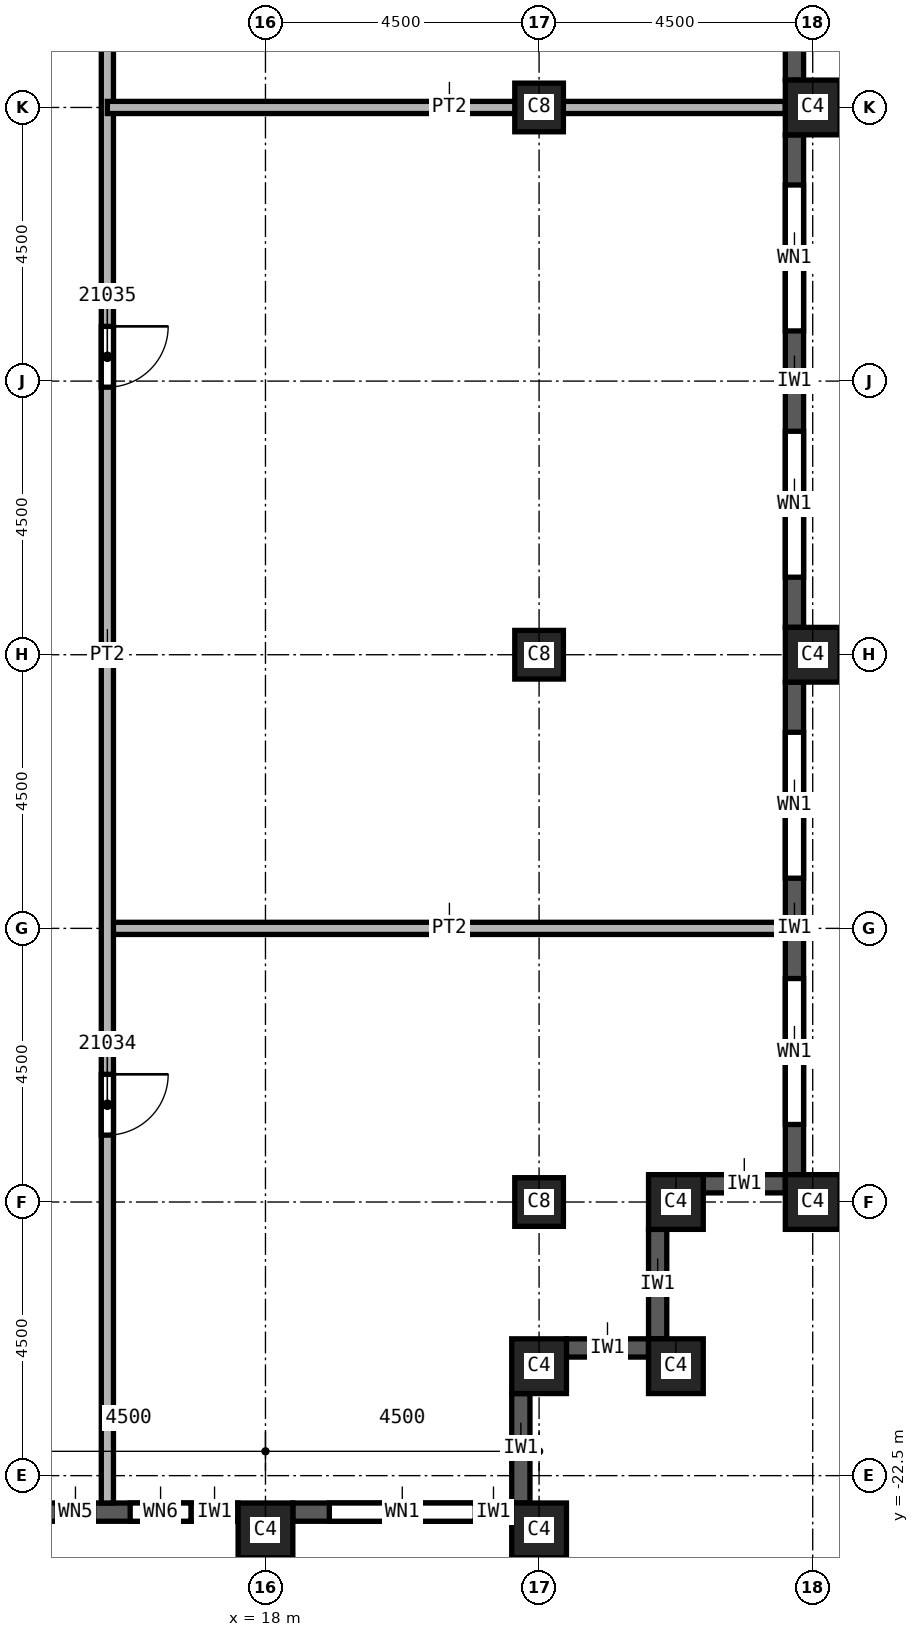
"""IFC4 building model, lengths in metres.
Left out: names, types, materials, properties, quantities, classifications, styles, units other than length and angle.
Written with IfcOpenShell. Run it as: python <this file> out.ifc"""

import sys

from ifc_helpers import new_model, si_unit, direction, frame, frame_2d, origin, origin_2d, place, context, subcontext, project, spatial, rectangle, extrude, element, fill, save


model = new_model("IFC4")
c1 = context("Model", 3, precision=1e-05, world=origin(), true_north=direction((0.0, 1.0)))
c2 = subcontext(c1, "Body", "Model", "MODEL_VIEW")
j1 = project(units=[si_unit("LENGTHUNIT", "METRE"), si_unit("PLANEANGLEUNIT", "RADIAN")], contexts=[c1])
p1 = place(None, origin())
s1 = spatial("IfcSite", under=j1, at=p1, CompositionType="ELEMENT")
p2 = place(p1, origin())
s2 = spatial("IfcBuilding", under=s1, at=p2, CompositionType="ELEMENT")
p3 = place(p2, frame((0.0, 0.0, 308.0)))
s3 = spatial("IfcBuildingStorey", under=s2, at=p3, CompositionType="ELEMENT", Elevation=308.0)
for number, where, z_axis, x_axis in (
    (1, (22.5, 0.0, 0.0), (0.0, 0.0, 1.0), (1.0, 0.0, 0.0)),
    (2, (22.5, -9.0, 0.0), (0.0, 0.0, 1.0), (1.0, 0.0, 0.0)),
    (3, (22.5, -18.0, 0.0), (0.0, 0.0, 1.0), (1.0, 0.0, 0.0)),
):
    element("IfcColumn", number, at=place(p3, frame(where, z_axis=z_axis, x_axis=x_axis)), inside=s3, PredefinedType="COLUMN", context=c2, shape_type="SweptSolid", body=[
        extrude(rectangle(XDim=0.8, YDim=0.8, at=origin_2d()), origin(), (0.0, 0.0, 1.0), 3.74),
    ])
for number, where, z_axis, x_axis in (
    (4, (27.0, 0.0, 0.0), (0.0, 0.0, 1.0), (0.0, 1.0, 0.0)),
    (5, (27.0, -9.0, 0.0), (0.0, 0.0, 1.0), (0.0, 1.0, 0.0)),
    (6, (27.0, -18.0, 0.0), (0.0, 0.0, 1.0), (0.0, 1.0, 0.0)),
    (7, (18.0, -23.4, 0.0), (0.0, 0.0, 1.0), (1.0, 0.0, 0.0)),
    (8, (22.5, -23.4, 0.0), (0.0, 0.0, 1.0), (1.0, 0.0, 0.0)),
    (9, (22.5, -20.7, 0.0), (0.0, 0.0, 1.0), (1.0, 0.0, 0.0)),
    (10, (24.75, -20.7, 0.0), (0.0, 0.0, 1.0), (1.0, 0.0, 0.0)),
    (11, (24.75, -18.0, 0.0), (0.0, 0.0, 1.0), (1.0, 0.0, 0.0)),
):
    element("IfcColumn", number, at=place(p3, frame(where, z_axis=z_axis, x_axis=x_axis)), inside=s3, PredefinedType="COLUMN", context=c2, shape_type="SweptSolid", body=[
        extrude(rectangle(XDim=0.9, YDim=0.9, at=origin_2d()), origin(), (0.0, 0.0, 1.0), 3.74),
    ])
p4 = place(p3, frame((13.95, -23.1, 0.0), z_axis=(0.0, 0.0, 1.0), x_axis=(1.0, 0.0, 0.0)))
e12 = element("IfcWall", 12, at=p4, inside=s3, PredefinedType="SOLIDWALL", context=c2, shape_type="SweptSolid", body=[
    extrude(rectangle(XDim=3.6, YDim=0.3, at=frame_2d((1.8, 0.0))), origin(), (0.0, 0.0, 1.0), 3.14),
])
p5 = place(p4, frame((0.625, 0.0, 0.8)))
e13 = element("IfcOpeningElement", 13, at=p5, cuts=e12, PredefinedType="OPENING", context=c2, shape_type="SweptSolid", body=[
    extrude(rectangle(XDim=0.6, YDim=1.95, at=frame_2d((0.3, 0.975))), frame((0.0, 0.15, 0.0), z_axis=(0.0, -1.0, 0.0), x_axis=(1.0, 0.0, 0.0)), (0.0, 0.0, 1.0), 0.3),
])
p6 = place(p4, frame((1.825, 0.0, 0.8)))
e14 = element("IfcOpeningElement", 14, at=p6, cuts=e12, PredefinedType="OPENING", context=c2, shape_type="SweptSolid", body=[
    extrude(rectangle(XDim=1.0, YDim=1.95, at=frame_2d((0.5, 0.975))), frame((0.0, 0.15, 0.0), z_axis=(0.0, -1.0, 0.0), x_axis=(1.0, 0.0, 0.0)), (0.0, 0.0, 1.0), 0.3),
])
p7 = place(p3, frame((18.45, -23.1, 0.0), z_axis=(0.0, 0.0, 1.0), x_axis=(1.0, 0.0, 0.0)))
e15 = element("IfcWall", 15, at=p7, inside=s3, PredefinedType="SOLIDWALL", context=c2, shape_type="SweptSolid", body=[
    extrude(rectangle(XDim=3.6, YDim=0.3, at=frame_2d((1.8, 0.0))), origin(), (0.0, 0.0, 1.0), 3.14),
])
p8 = place(p7, frame((0.6, 0.0, 0.8)))
e16 = element("IfcOpeningElement", 16, at=p8, cuts=e15, PredefinedType="OPENING", context=c2, shape_type="SweptSolid", body=[
    extrude(rectangle(XDim=2.4, YDim=1.95, at=frame_2d((1.2, 0.975))), frame((0.0, 0.15, 0.0), z_axis=(0.0, -1.0, 0.0), x_axis=(1.0, 0.0, 0.0)), (0.0, 0.0, 1.0), 0.3),
])
p9 = place(p3, frame((22.2, -22.95, 0.0), z_axis=(0.0, 0.0, 1.0), x_axis=(0.0, 1.0, 0.0)))
e17 = element("IfcWall", 17, at=p9, inside=s3, PredefinedType="SOLIDWALL", context=c2, shape_type="SweptSolid", body=[
    extrude(rectangle(XDim=1.8, YDim=0.3, at=frame_2d((0.9, 0.0))), origin(), (0.0, 0.0, 1.0), 3.14),
])
p10 = place(p3, frame((22.95, -20.4, 0.0), z_axis=(0.0, 0.0, 1.0), x_axis=(1.0, 0.0, 0.0)))
e18 = element("IfcWall", 18, at=p10, inside=s3, PredefinedType="SOLIDWALL", context=c2, shape_type="SweptSolid", body=[
    extrude(rectangle(XDim=1.35, YDim=0.3, at=frame_2d((0.675, 0.0))), origin(), (0.0, 0.0, 1.0), 3.14),
])
p11 = place(p3, frame((24.45, -20.25, 0.0), z_axis=(0.0, 0.0, 1.0), x_axis=(0.0, 1.0, 0.0)))
e19 = element("IfcWall", 19, at=p11, inside=s3, PredefinedType="SOLIDWALL", context=c2, shape_type="SweptSolid", body=[
    extrude(rectangle(XDim=1.8, YDim=0.3, at=frame_2d((0.9, 0.0))), origin(), (0.0, 0.0, 1.0), 3.14),
])
p12 = place(p3, frame((25.2, -17.7, 0.0), z_axis=(0.0, 0.0, 1.0), x_axis=(1.0, 0.0, 0.0)))
e20 = element("IfcWall", 20, at=p12, inside=s3, PredefinedType="SOLIDWALL", context=c2, shape_type="SweptSolid", body=[
    extrude(rectangle(XDim=1.35, YDim=0.3, at=frame_2d((0.675, 0.0))), origin(), (0.0, 0.0, 1.0), 3.14),
])
p13 = place(p3, frame((26.7, -17.55, 0.0), z_axis=(0.0, 0.0, 1.0), x_axis=(0.0, 1.0, 0.0)))
e21 = element("IfcWall", 21, at=p13, inside=s3, PredefinedType="SOLIDWALL", context=c2, shape_type="SweptSolid", body=[
    extrude(rectangle(XDim=8.1, YDim=0.3, at=frame_2d((4.05, 0.0))), origin(), (0.0, 0.0, 1.0), 3.14),
])
p14 = place(p13, frame((0.825, 0.0, 0.8)))
e22 = element("IfcOpeningElement", 22, at=p14, cuts=e21, PredefinedType="OPENING", context=c2, shape_type="SweptSolid", body=[
    extrude(rectangle(XDim=2.4, YDim=1.95, at=frame_2d((1.2, 0.975))), frame((0.0, 0.15, 0.0), z_axis=(0.0, -1.0, 0.0), x_axis=(1.0, 0.0, 0.0)), (0.0, 0.0, 1.0), 0.3),
])
p15 = place(p13, frame((4.875, 0.0, 0.8)))
e23 = element("IfcOpeningElement", 23, at=p15, cuts=e21, PredefinedType="OPENING", context=c2, shape_type="SweptSolid", body=[
    extrude(rectangle(XDim=2.4, YDim=1.95, at=frame_2d((1.2, 0.975))), frame((0.0, 0.15, 0.0), z_axis=(0.0, -1.0, 0.0), x_axis=(1.0, 0.0, 0.0)), (0.0, 0.0, 1.0), 0.3),
])
p16 = place(p3, frame((26.7, -8.55, 0.0), z_axis=(0.0, 0.0, 1.0), x_axis=(0.0, 1.0, 0.0)))
e24 = element("IfcWall", 24, at=p16, inside=s3, PredefinedType="SOLIDWALL", context=c2, shape_type="SweptSolid", body=[
    extrude(rectangle(XDim=8.1, YDim=0.3, at=frame_2d((4.05, 0.0))), origin(), (0.0, 0.0, 1.0), 3.14),
])
p17 = place(p16, frame((0.825, 0.0, 0.8)))
e25 = element("IfcOpeningElement", 25, at=p17, cuts=e24, PredefinedType="OPENING", context=c2, shape_type="SweptSolid", body=[
    extrude(rectangle(XDim=2.4, YDim=1.95, at=frame_2d((1.2, 0.975))), frame((0.0, 0.15, 0.0), z_axis=(0.0, -1.0, 0.0), x_axis=(1.0, 0.0, 0.0)), (0.0, 0.0, 1.0), 0.3),
])
p18 = place(p16, frame((4.875, 0.0, 0.8)))
e26 = element("IfcOpeningElement", 26, at=p18, cuts=e24, PredefinedType="OPENING", context=c2, shape_type="SweptSolid", body=[
    extrude(rectangle(XDim=2.4, YDim=1.95, at=frame_2d((1.2, 0.975))), frame((0.0, 0.15, 0.0), z_axis=(0.0, -1.0, 0.0), x_axis=(1.0, 0.0, 0.0)), (0.0, 0.0, 1.0), 0.3),
])
p19 = place(p3, frame((26.7, 0.45, 0.0), z_axis=(0.0, 0.0, 1.0), x_axis=(0.0, 1.0, 0.0)))
e27 = element("IfcWall", 27, at=p19, inside=s3, PredefinedType="SOLIDWALL", context=c2, shape_type="SweptSolid", body=[
    extrude(rectangle(XDim=8.1, YDim=0.3, at=frame_2d((4.05, 0.0))), origin(), (0.0, 0.0, 1.0), 3.14),
])
p20 = place(p19, frame((0.825, 0.0, 0.8)))
e28 = element("IfcOpeningElement", 28, at=p20, cuts=e27, PredefinedType="OPENING", context=c2, shape_type="SweptSolid", body=[
    extrude(rectangle(XDim=2.4, YDim=1.95, at=frame_2d((1.2, 0.975))), frame((0.0, 0.15, 0.0), z_axis=(0.0, -1.0, 0.0), x_axis=(1.0, 0.0, 0.0)), (0.0, 0.0, 1.0), 0.3),
])
p21 = place(p19, frame((4.875, 0.0, 0.8)))
e29 = element("IfcOpeningElement", 29, at=p21, cuts=e27, PredefinedType="OPENING", context=c2, shape_type="SweptSolid", body=[
    extrude(rectangle(XDim=2.4, YDim=1.95, at=frame_2d((1.2, 0.975))), frame((0.0, 0.15, 0.0), z_axis=(0.0, -1.0, 0.0), x_axis=(1.0, 0.0, 0.0)), (0.0, 0.0, 1.0), 0.3),
])
p22 = place(p3, frame((15.4, -13.5, 0.0), z_axis=(0.0, 0.0, 1.0), x_axis=(1.0, 0.0, 0.0)))
e30 = element("IfcWall", 30, at=p22, inside=s3, PredefinedType="PARTITIONING", context=c2, shape_type="SweptSolid", body=[
    extrude(rectangle(XDim=11.15, YDim=0.2, at=frame_2d((5.575, 0.0))), origin(), (0.0, 0.0, 1.0), 3.74),
])
p23 = place(p3, frame((15.4, 22.95, 0.0), z_axis=(0.0, 0.0, 1.0), x_axis=(0.0, -1.0, 0.0)))
e31 = element("IfcWall", 31, at=p23, inside=s3, PredefinedType="PARTITIONING", context=c2, shape_type="SweptSolid", body=[
    extrude(rectangle(XDim=45.9, YDim=0.2, at=frame_2d((22.95, 0.0))), origin(), (0.0, 0.0, 1.0), 3.74),
])
p24 = place(p23, frame((20.7, 0.0, 0.0)))
e32 = element("IfcOpeningElement", 32, at=p24, cuts=e31, PredefinedType="OPENING", context=c2, shape_type="SweptSolid", body=[
    extrude(rectangle(XDim=1.0, YDim=2.1, at=frame_2d((0.5, 1.05))), frame((0.0, 0.1, 0.0), z_axis=(0.0, -1.0, 0.0), x_axis=(1.0, 0.0, 0.0)), (0.0, 0.0, 1.0), 0.2),
])
p25 = place(p23, frame((11.85, 0.0, 0.0)))
e33 = element("IfcOpeningElement", 33, at=p25, cuts=e31, PredefinedType="OPENING", context=c2, shape_type="SweptSolid", body=[
    extrude(rectangle(XDim=1.0, YDim=2.1, at=frame_2d((0.5, 1.05))), frame((0.0, 0.1, 0.0), z_axis=(0.0, -1.0, 0.0), x_axis=(1.0, 0.0, 0.0)), (0.0, 0.0, 1.0), 0.2),
])
p26 = place(p23, frame((4.725, 0.0, 0.0)))
e34 = element("IfcOpeningElement", 34, at=p26, cuts=e31, PredefinedType="OPENING", context=c2, shape_type="SweptSolid", body=[
    extrude(rectangle(XDim=1.0, YDim=2.1, at=frame_2d((0.5, 1.05))), frame((0.0, 0.1, 0.0), z_axis=(0.0, -1.0, 0.0), x_axis=(1.0, 0.0, 0.0)), (0.0, 0.0, 1.0), 0.2),
])
p27 = place(p23, frame((0.4, 0.0, 0.0)))
e35 = element("IfcOpeningElement", 35, at=p27, cuts=e31, PredefinedType="OPENING", context=c2, shape_type="SweptSolid", body=[
    extrude(rectangle(XDim=1.0, YDim=2.1, at=frame_2d((0.5, 1.05))), frame((0.0, 0.1, 0.0), z_axis=(0.0, -1.0, 0.0), x_axis=(1.0, 0.0, 0.0)), (0.0, 0.0, 1.0), 0.2),
])
p28 = place(p23, frame((38.85, 0.0, 0.0)))
e36 = element("IfcOpeningElement", 36, at=p28, cuts=e31, PredefinedType="OPENING", context=c2, shape_type="SweptSolid", body=[
    extrude(rectangle(XDim=1.0, YDim=2.1, at=frame_2d((0.5, 1.05))), frame((0.0, 0.1, 0.0), z_axis=(0.0, -1.0, 0.0), x_axis=(1.0, 0.0, 0.0)), (0.0, 0.0, 1.0), 0.2),
])
p29 = place(p23, frame((26.55, 0.0, 0.0)))
e37 = element("IfcOpeningElement", 37, at=p29, cuts=e31, PredefinedType="OPENING", context=c2, shape_type="SweptSolid", body=[
    extrude(rectangle(XDim=1.0, YDim=2.1, at=frame_2d((0.5, 1.05))), frame((0.0, 0.1, 0.0), z_axis=(0.0, -1.0, 0.0), x_axis=(1.0, 0.0, 0.0)), (0.0, 0.0, 1.0), 0.2),
])
p30 = place(p3, frame((26.55, 0.0, 0.0), z_axis=(0.0, 0.0, 1.0), x_axis=(-1.0, 0.0, 0.0)))
e38 = element("IfcWall", 38, at=p30, inside=s3, PredefinedType="PARTITIONING", context=c2, shape_type="SweptSolid", body=[
    extrude(rectangle(XDim=11.15, YDim=0.2, at=frame_2d((5.575, 0.0))), origin(), (0.0, 0.0, 1.0), 3.74),
])
p31 = place(p8, origin())
e39 = element("IfcWindow", 39, at=p31, inside=s3, PartitioningType="SINGLE_PANEL", PredefinedType="WINDOW", context=c2, shape_type="SweptSolid", body=[
    extrude(rectangle(XDim=2.4, YDim=1.95, at=frame_2d((1.2, 0.975))), frame((0.0, 0.03, 0.0), z_axis=(0.0, -1.0, 0.0), x_axis=(1.0, 0.0, 0.0)), (0.0, 0.0, 1.0), 0.06),
])
fill(e16, e39)
p32 = place(p14, origin())
e40 = element("IfcWindow", 40, at=p32, inside=s3, PartitioningType="SINGLE_PANEL", PredefinedType="WINDOW", context=c2, shape_type="SweptSolid", body=[
    extrude(rectangle(XDim=2.4, YDim=1.95, at=frame_2d((1.2, 0.975))), frame((0.0, 0.03, 0.0), z_axis=(0.0, -1.0, 0.0), x_axis=(1.0, 0.0, 0.0)), (0.0, 0.0, 1.0), 0.06),
])
fill(e22, e40)
p33 = place(p15, origin())
e41 = element("IfcWindow", 41, at=p33, inside=s3, PartitioningType="SINGLE_PANEL", PredefinedType="WINDOW", context=c2, shape_type="SweptSolid", body=[
    extrude(rectangle(XDim=2.4, YDim=1.95, at=frame_2d((1.2, 0.975))), frame((0.0, 0.03, 0.0), z_axis=(0.0, -1.0, 0.0), x_axis=(1.0, 0.0, 0.0)), (0.0, 0.0, 1.0), 0.06),
])
fill(e23, e41)
p34 = place(p17, origin())
e42 = element("IfcWindow", 42, at=p34, inside=s3, PartitioningType="SINGLE_PANEL", PredefinedType="WINDOW", context=c2, shape_type="SweptSolid", body=[
    extrude(rectangle(XDim=2.4, YDim=1.95, at=frame_2d((1.2, 0.975))), frame((0.0, 0.03, 0.0), z_axis=(0.0, -1.0, 0.0), x_axis=(1.0, 0.0, 0.0)), (0.0, 0.0, 1.0), 0.06),
])
fill(e25, e42)
p35 = place(p18, origin())
e43 = element("IfcWindow", 43, at=p35, inside=s3, PartitioningType="SINGLE_PANEL", PredefinedType="WINDOW", context=c2, shape_type="SweptSolid", body=[
    extrude(rectangle(XDim=2.4, YDim=1.95, at=frame_2d((1.2, 0.975))), frame((0.0, 0.03, 0.0), z_axis=(0.0, -1.0, 0.0), x_axis=(1.0, 0.0, 0.0)), (0.0, 0.0, 1.0), 0.06),
])
fill(e26, e43)
p36 = place(p28, origin())
e44 = element("IfcDoor", 44, at=p36, inside=s3, OperationType="SINGLE_SWING_LEFT", PredefinedType="DOOR", context=c2, shape_type="SweptSolid", body=[
    extrude(rectangle(XDim=1.0, YDim=2.1, at=frame_2d((0.5, 1.05))), frame((0.0, 0.025, 0.0), z_axis=(0.0, -1.0, 0.0), x_axis=(1.0, 0.0, 0.0)), (0.0, 0.0, 1.0), 0.05),
])
fill(e36, e44)
p37 = place(p29, origin())
e45 = element("IfcDoor", 45, at=p37, inside=s3, OperationType="SINGLE_SWING_RIGHT", PredefinedType="DOOR", context=c2, shape_type="SweptSolid", body=[
    extrude(rectangle(XDim=1.0, YDim=2.1, at=frame_2d((0.5, 1.05))), frame((0.0, 0.025, 0.0), z_axis=(0.0, -1.0, 0.0), x_axis=(1.0, 0.0, 0.0)), (0.0, 0.0, 1.0), 0.05),
])
fill(e37, e45)
p38 = place(p5, origin())
e46 = element("IfcWindow", 46, at=p38, inside=s3, PartitioningType="SINGLE_PANEL", PredefinedType="WINDOW", context=c2, shape_type="SweptSolid", body=[
    extrude(rectangle(XDim=0.6, YDim=1.95, at=frame_2d((0.3, 0.975))), frame((0.0, 0.03, 0.0), z_axis=(0.0, -1.0, 0.0), x_axis=(1.0, 0.0, 0.0)), (0.0, 0.0, 1.0), 0.06),
])
fill(e13, e46)
p39 = place(p6, origin())
e47 = element("IfcWindow", 47, at=p39, inside=s3, PartitioningType="SINGLE_PANEL", PredefinedType="WINDOW", context=c2, shape_type="SweptSolid", body=[
    extrude(rectangle(XDim=1.0, YDim=1.95, at=frame_2d((0.5, 0.975))), frame((0.0, 0.03, 0.0), z_axis=(0.0, -1.0, 0.0), x_axis=(1.0, 0.0, 0.0)), (0.0, 0.0, 1.0), 0.06),
])
fill(e14, e47)
save(model, sys.argv[1])
